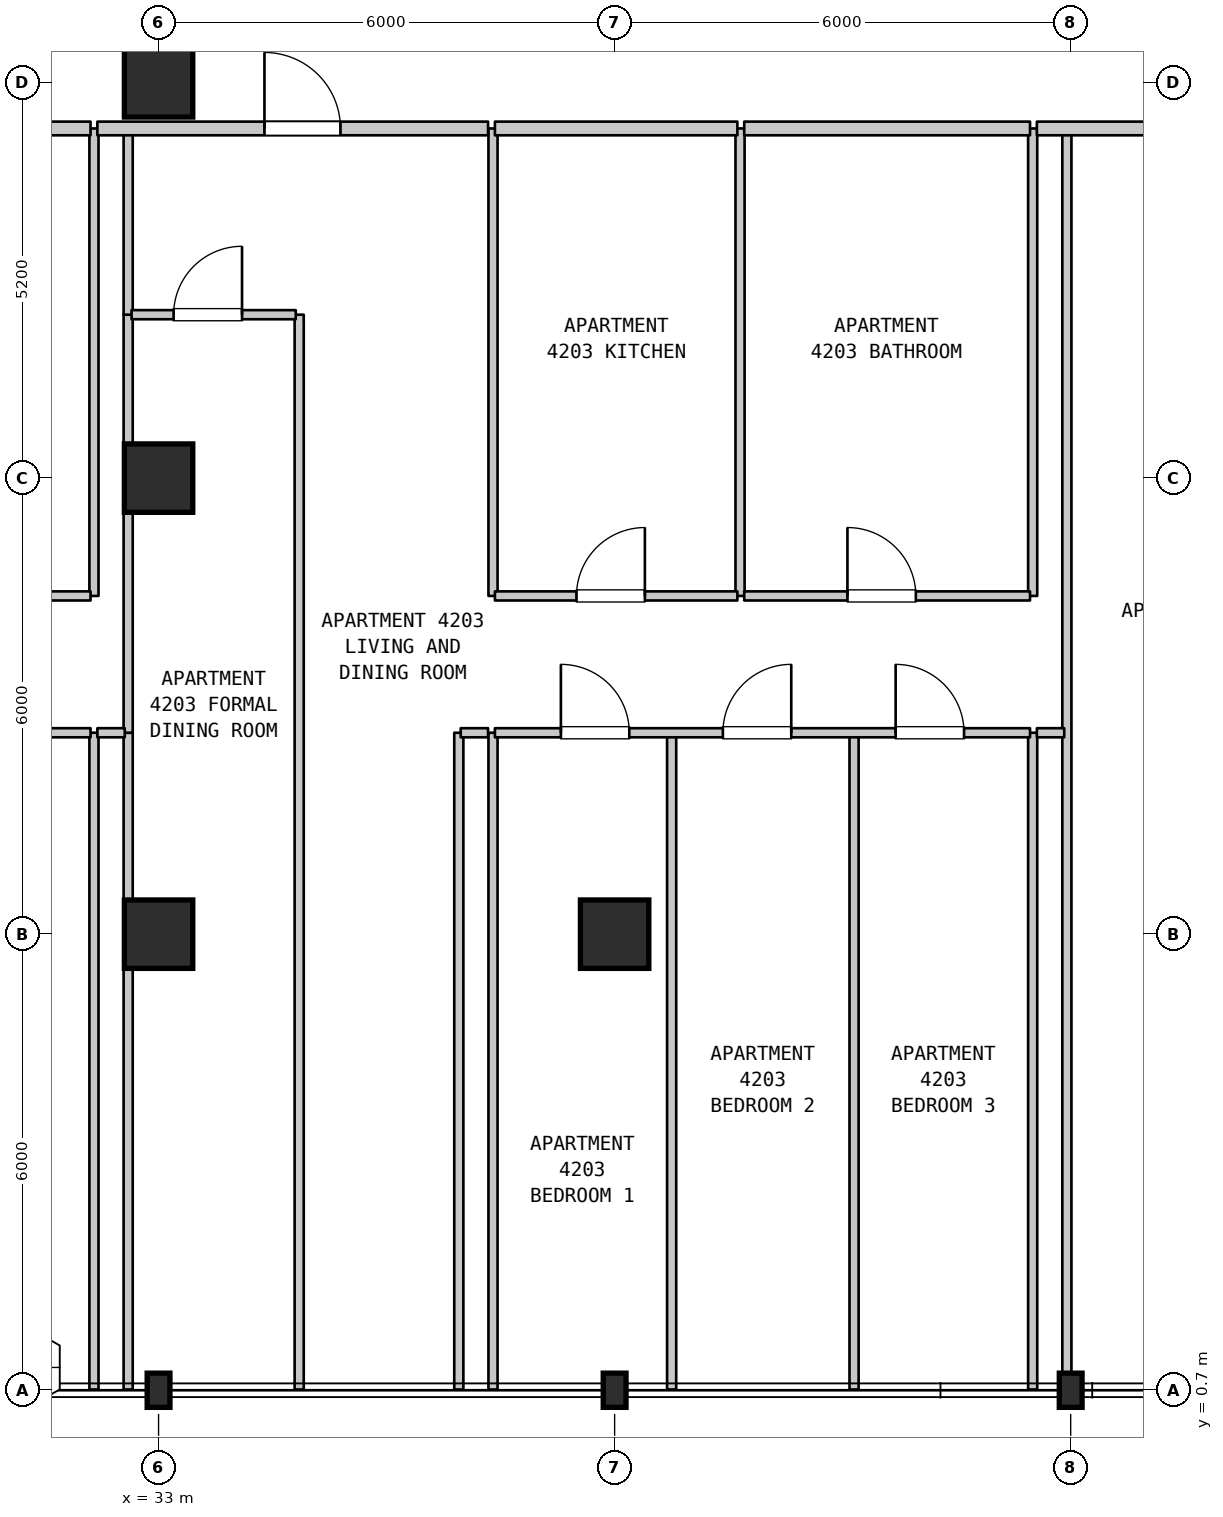
"""IFC4 building model, lengths in metres.
Left out: names, types, materials, properties, quantities, classifications, styles, units other than length and angle.
Written with IfcOpenShell. Run it as: python <this file> out.ifc"""

import sys

from ifc_helpers import new_model, si_unit, direction, frame, frame_2d, origin, origin_2d, place, context, subcontext, project, spatial, rectangle, i_section, extrude, element, fill, save


model = new_model("IFC4")
c1 = context("Model", 3, precision=1e-05, world=origin(), true_north=direction((0.0, 1.0)))
c2 = subcontext(c1, "Body", "Model", "MODEL_VIEW")
j1 = project(units=[si_unit("LENGTHUNIT", "METRE"), si_unit("PLANEANGLEUNIT", "RADIAN")], contexts=[c1])
p1 = place(None, origin())
s1 = spatial("IfcSite", under=j1, at=p1, CompositionType="ELEMENT")
p2 = place(p1, origin())
s2 = spatial("IfcBuilding", under=s1, at=p2, CompositionType="ELEMENT")
p3 = place(p2, frame((0.0, 0.0, 172.8)))
s3 = spatial("IfcBuildingStorey", under=s2, at=p3, CompositionType="ELEMENT", Elevation=172.8)
p4 = place(p3, frame((33.0, 0.7, 0.0), z_axis=(0.0, 0.0, 1.0), x_axis=(1.0, 0.0, 0.0)))
e1 = element("IfcColumn", 1, at=p4, inside=s3, PredefinedType="COLUMN", context=c2, shape_type="SweptSolid", body=[
    extrude(i_section(OverallWidth=0.3, OverallDepth=0.45, WebThickness=0.014, FlangeThickness=0.026, FilletRadius=0.027, at=origin_2d()), origin(), (0.0, 0.0, 1.0), 3.7),
])
for number, where, z_axis, x_axis in (
    (2, (33.0, 6.7, 0.0), (0.0, 0.0, 1.0), (1.0, 0.0, 0.0)),
    (3, (33.0, 12.7, 0.0), (0.0, 0.0, 1.0), (1.0, 0.0, 0.0)),
    (4, (33.0, 17.9, 0.0), (0.0, 0.0, 1.0), (1.0, 0.0, 0.0)),
):
    element("IfcColumn", number, at=place(p3, frame(where, z_axis=z_axis, x_axis=x_axis)), inside=s3, PredefinedType="COLUMN", context=c2, shape_type="SweptSolid", body=[
        extrude(rectangle(XDim=0.9, YDim=0.9, at=origin_2d()), origin(), (0.0, 0.0, 1.0), 3.7),
    ])
p5 = place(p3, frame((39.0, 0.7, 0.0), z_axis=(0.0, 0.0, 1.0), x_axis=(1.0, 0.0, 0.0)))
e5 = element("IfcColumn", 5, at=p5, inside=s3, PredefinedType="COLUMN", context=c2, shape_type="SweptSolid", body=[
    extrude(i_section(OverallWidth=0.3, OverallDepth=0.45, WebThickness=0.014, FlangeThickness=0.026, FilletRadius=0.027, at=origin_2d()), origin(), (0.0, 0.0, 1.0), 3.7),
])
p6 = place(p3, frame((39.0, 6.7, 0.0), z_axis=(0.0, 0.0, 1.0), x_axis=(1.0, 0.0, 0.0)))
e6 = element("IfcColumn", 6, at=p6, inside=s3, PredefinedType="COLUMN", context=c2, shape_type="SweptSolid", body=[
    extrude(rectangle(XDim=0.9, YDim=0.9, at=origin_2d()), origin(), (0.0, 0.0, 1.0), 3.7),
])
p7 = place(p3, frame((45.0, 0.7, 0.0), z_axis=(0.0, 0.0, 1.0), x_axis=(1.0, 0.0, 0.0)))
e7 = element("IfcColumn", 7, at=p7, inside=s3, PredefinedType="COLUMN", context=c2, shape_type="SweptSolid", body=[
    extrude(i_section(OverallWidth=0.3, OverallDepth=0.45, WebThickness=0.014, FlangeThickness=0.026, FilletRadius=0.027, at=origin_2d()), origin(), (0.0, 0.0, 1.0), 3.7),
])
p8 = place(p3, frame((32.15, 0.71, 0.0), z_axis=(0.0, 0.0, 1.0), x_axis=(0.0, 1.0, 0.0)))
e8 = element("IfcWall", 8, at=p8, inside=s3, PredefinedType="PARTITIONING", context=c2, shape_type="SweptSolid", body=[
    extrude(rectangle(XDim=8.64, YDim=0.12, at=frame_2d((4.32, 0.0))), origin(), (0.0, 0.0, 1.0), 3.39),
])
p9 = place(p3, frame((32.15, 11.15, 0.0), z_axis=(0.0, 0.0, 1.0), x_axis=(0.0, 1.0, 0.0)))
e9 = element("IfcWall", 9, at=p9, inside=s3, PredefinedType="PARTITIONING", context=c2, shape_type="SweptSolid", body=[
    extrude(rectangle(XDim=6.15, YDim=0.12, at=frame_2d((3.075, 0.0))), origin(), (0.0, 0.0, 1.0), 3.39),
])
p10 = place(p3, frame((32.6, 0.71, 0.0), z_axis=(0.0, 0.0, 1.0), x_axis=(0.0, 1.0, 0.0)))
e10 = element("IfcWall", 10, at=p10, inside=s3, PredefinedType="PARTITIONING", context=c2, shape_type="SweptSolid", body=[
    extrude(rectangle(XDim=8.64, YDim=0.12, at=frame_2d((4.32, 0.0))), origin(), (0.0, 0.0, 1.0), 3.39),
])
p11 = place(p3, frame((32.6, 9.35, 0.0), z_axis=(0.0, 0.0, 1.0), x_axis=(0.0, 1.0, 0.0)))
e11 = element("IfcWall", 11, at=p11, inside=s3, PredefinedType="PARTITIONING", context=c2, shape_type="SweptSolid", body=[
    extrude(rectangle(XDim=5.5, YDim=0.12, at=frame_2d((2.75, 0.0))), origin(), (0.0, 0.0, 1.0), 3.39),
])
p12 = place(p3, frame((32.6, 14.85, 0.0), z_axis=(0.0, 0.0, 1.0), x_axis=(0.0, 1.0, 0.0)))
e12 = element("IfcWall", 12, at=p12, inside=s3, PredefinedType="PARTITIONING", context=c2, shape_type="SweptSolid", body=[
    extrude(rectangle(XDim=2.45, YDim=0.12, at=frame_2d((1.225, 0.0))), origin(), (0.0, 0.0, 1.0), 3.39),
])
p13 = place(p3, frame((34.85, 0.71, 0.0), z_axis=(0.0, 0.0, 1.0), x_axis=(0.0, 1.0, 0.0)))
e13 = element("IfcWall", 13, at=p13, inside=s3, PredefinedType="PARTITIONING", context=c2, shape_type="SweptSolid", body=[
    extrude(rectangle(XDim=14.14, YDim=0.12, at=frame_2d((7.07, 0.0))), origin(), (0.0, 0.0, 1.0), 3.39),
])
for number, where, z_axis, x_axis in (
    (14, (36.95, 0.71, 0.0), (0.0, 0.0, 1.0), (0.0, 1.0, 0.0)),
    (15, (37.4, 0.71, 0.0), (0.0, 0.0, 1.0), (0.0, 1.0, 0.0)),
):
    element("IfcWall", number, at=place(p3, frame(where, z_axis=z_axis, x_axis=x_axis)), inside=s3, PredefinedType="PARTITIONING", context=c2, shape_type="SweptSolid", body=[
        extrude(rectangle(XDim=8.64, YDim=0.12, at=frame_2d((4.32, 0.0))), origin(), (0.0, 0.0, 1.0), 3.39),
    ])
p14 = place(p3, frame((37.4, 11.15, 0.0), z_axis=(0.0, 0.0, 1.0), x_axis=(0.0, 1.0, 0.0)))
e16 = element("IfcWall", 16, at=p14, inside=s3, PredefinedType="PARTITIONING", context=c2, shape_type="SweptSolid", body=[
    extrude(rectangle(XDim=6.15, YDim=0.12, at=frame_2d((3.075, 0.0))), origin(), (0.0, 0.0, 1.0), 3.39),
])
p15 = place(p3, frame((39.75, 0.71, 0.0), z_axis=(0.0, 0.0, 1.0), x_axis=(0.0, 1.0, 0.0)))
e17 = element("IfcWall", 17, at=p15, inside=s3, PredefinedType="PARTITIONING", context=c2, shape_type="SweptSolid", body=[
    extrude(rectangle(XDim=8.64, YDim=0.12, at=frame_2d((4.32, 0.0))), origin(), (0.0, 0.0, 1.0), 3.39),
])
p16 = place(p3, frame((40.65, 11.15, 0.0), z_axis=(0.0, 0.0, 1.0), x_axis=(0.0, 1.0, 0.0)))
e18 = element("IfcWall", 18, at=p16, inside=s3, PredefinedType="PARTITIONING", context=c2, shape_type="SweptSolid", body=[
    extrude(rectangle(XDim=6.15, YDim=0.12, at=frame_2d((3.075, 0.0))), origin(), (0.0, 0.0, 1.0), 3.39),
])
for number, where, z_axis, x_axis in (
    (19, (42.15, 0.71, 0.0), (0.0, 0.0, 1.0), (0.0, 1.0, 0.0)),
    (20, (44.5, 0.71, 0.0), (0.0, 0.0, 1.0), (0.0, 1.0, 0.0)),
):
    element("IfcWall", number, at=place(p3, frame(where, z_axis=z_axis, x_axis=x_axis)), inside=s3, PredefinedType="PARTITIONING", context=c2, shape_type="SweptSolid", body=[
        extrude(rectangle(XDim=8.64, YDim=0.12, at=frame_2d((4.32, 0.0))), origin(), (0.0, 0.0, 1.0), 3.39),
    ])
p17 = place(p3, frame((44.5, 11.15, 0.0), z_axis=(0.0, 0.0, 1.0), x_axis=(0.0, 1.0, 0.0)))
e21 = element("IfcWall", 21, at=p17, inside=s3, PredefinedType="PARTITIONING", context=c2, shape_type="SweptSolid", body=[
    extrude(rectangle(XDim=6.15, YDim=0.12, at=frame_2d((3.075, 0.0))), origin(), (0.0, 0.0, 1.0), 3.39),
])
p18 = place(p3, frame((44.95, 0.71, 0.0), z_axis=(0.0, 0.0, 1.0), x_axis=(0.0, 1.0, 0.0)))
e22 = element("IfcWall", 22, at=p18, inside=s3, PredefinedType="PARTITIONING", context=c2, shape_type="SweptSolid", body=[
    extrude(rectangle(XDim=16.59, YDim=0.12, at=frame_2d((8.295, 0.0))), origin(), (0.0, 0.0, 1.0), 3.39),
])
p19 = place(p3, frame((25.375, 9.35, 0.0), z_axis=(0.0, 0.0, 1.0), x_axis=(1.0, 0.0, 0.0)))
e23 = element("IfcWall", 23, at=p19, inside=s3, PredefinedType="PARTITIONING", context=c2, shape_type="SweptSolid", body=[
    extrude(rectangle(XDim=6.73, YDim=0.12, at=frame_2d((3.365, 0.0))), origin(), (0.0, 0.0, 1.0), 3.39),
])
p20 = place(p19, frame((1.31, 0.0, 0.0)))
e24 = element("IfcOpeningElement", 24, at=p20, cuts=e23, PredefinedType="OPENING", context=c2, shape_type="SweptSolid", body=[
    extrude(rectangle(XDim=0.9, YDim=2.15, at=frame_2d((0.45, 1.075))), frame((0.0, 0.07, 0.0), z_axis=(0.0, -1.0, 0.0), x_axis=(1.0, 0.0, 0.0)), (0.0, 0.0, 1.0), 0.14),
])
p21 = place(p19, frame((4.37, 0.0, 0.0)))
e25 = element("IfcOpeningElement", 25, at=p21, cuts=e23, PredefinedType="OPENING", context=c2, shape_type="SweptSolid", body=[
    extrude(rectangle(XDim=0.9, YDim=2.15, at=frame_2d((0.45, 1.075))), frame((0.0, 0.07, 0.0), z_axis=(0.0, -1.0, 0.0), x_axis=(1.0, 0.0, 0.0)), (0.0, 0.0, 1.0), 0.14),
])
for number, where, z_axis, x_axis in (
    (26, (32.195, 9.35, 0.0), (0.0, 0.0, 1.0), (1.0, 0.0, 0.0)),
    (27, (36.975, 9.35, 0.0), (0.0, 0.0, 1.0), (1.0, 0.0, 0.0)),
):
    element("IfcWall", number, at=place(p3, frame(where, z_axis=z_axis, x_axis=x_axis)), inside=s3, PredefinedType="PARTITIONING", context=c2, shape_type="SweptSolid", body=[
        extrude(rectangle(XDim=0.36, YDim=0.12, at=frame_2d((0.18, 0.0))), origin(), (0.0, 0.0, 1.0), 3.39),
    ])
p22 = place(p3, frame((37.425, 9.35, 0.0), z_axis=(0.0, 0.0, 1.0), x_axis=(1.0, 0.0, 0.0)))
e28 = element("IfcWall", 28, at=p22, inside=s3, PredefinedType="PARTITIONING", context=c2, shape_type="SweptSolid", body=[
    extrude(rectangle(XDim=7.04, YDim=0.12, at=frame_2d((3.52, 0.0))), origin(), (0.0, 0.0, 1.0), 3.39),
])
p23 = place(p22, frame((0.868, 0.0, 0.0)))
e29 = element("IfcOpeningElement", 29, at=p23, cuts=e28, PredefinedType="OPENING", context=c2, shape_type="SweptSolid", body=[
    extrude(rectangle(XDim=0.9, YDim=2.15, at=frame_2d((0.45, 1.075))), frame((0.0, 0.07, 0.0), z_axis=(0.0, -1.0, 0.0), x_axis=(1.0, 0.0, 0.0)), (0.0, 0.0, 1.0), 0.14),
])
p24 = place(p22, frame((2.999, 0.0, 0.0)))
e30 = element("IfcOpeningElement", 30, at=p24, cuts=e28, PredefinedType="OPENING", context=c2, shape_type="SweptSolid", body=[
    extrude(rectangle(XDim=0.9, YDim=2.15, at=frame_2d((0.45, 1.075))), frame((0.0, 0.07, 0.0), z_axis=(0.0, -1.0, 0.0), x_axis=(1.0, 0.0, 0.0)), (0.0, 0.0, 1.0), 0.14),
])
p25 = place(p22, frame((5.272, 0.0, 0.0)))
e31 = element("IfcOpeningElement", 31, at=p25, cuts=e28, PredefinedType="OPENING", context=c2, shape_type="SweptSolid", body=[
    extrude(rectangle(XDim=0.9, YDim=2.15, at=frame_2d((0.45, 1.075))), frame((0.0, 0.07, 0.0), z_axis=(0.0, -1.0, 0.0), x_axis=(1.0, 0.0, 0.0)), (0.0, 0.0, 1.0), 0.14),
])
p26 = place(p3, frame((44.555, 9.35, 0.0), z_axis=(0.0, 0.0, 1.0), x_axis=(1.0, 0.0, 0.0)))
e32 = element("IfcWall", 32, at=p26, inside=s3, PredefinedType="PARTITIONING", context=c2, shape_type="SweptSolid", body=[
    extrude(rectangle(XDim=0.36, YDim=0.12, at=frame_2d((0.18, 0.0))), origin(), (0.0, 0.0, 1.0), 3.39),
])
p27 = place(p3, frame((28.512, 11.15, 0.0), z_axis=(0.0, 0.0, 1.0), x_axis=(1.0, 0.0, 0.0)))
e33 = element("IfcWall", 33, at=p27, inside=s3, PredefinedType="PARTITIONING", context=c2, shape_type="SweptSolid", body=[
    extrude(rectangle(XDim=3.593, YDim=0.12, at=frame_2d((1.796, 0.0))), origin(), (0.0, 0.0, 1.0), 3.39),
])
p28 = place(p27, frame((1.346, 0.0, 0.0)))
e34 = element("IfcOpeningElement", 34, at=p28, cuts=e33, PredefinedType="OPENING", context=c2, shape_type="SweptSolid", body=[
    extrude(rectangle(XDim=0.9, YDim=2.1, at=frame_2d((0.45, 1.05))), frame((0.0, 0.07, 0.0), z_axis=(0.0, -1.0, 0.0), x_axis=(1.0, 0.0, 0.0)), (0.0, 0.0, 1.0), 0.14),
])
p29 = place(p3, frame((37.425, 11.15, 0.0), z_axis=(0.0, 0.0, 1.0), x_axis=(1.0, 0.0, 0.0)))
e35 = element("IfcWall", 35, at=p29, inside=s3, PredefinedType="PARTITIONING", context=c2, shape_type="SweptSolid", body=[
    extrude(rectangle(XDim=3.19, YDim=0.12, at=frame_2d((1.595, 0.0))), origin(), (0.0, 0.0, 1.0), 3.39),
])
p30 = place(p29, frame((1.073, 0.0, 0.0)))
e36 = element("IfcOpeningElement", 36, at=p30, cuts=e35, PredefinedType="OPENING", context=c2, shape_type="SweptSolid", body=[
    extrude(rectangle(XDim=0.9, YDim=2.15, at=frame_2d((0.45, 1.075))), frame((0.0, 0.07, 0.0), z_axis=(0.0, -1.0, 0.0), x_axis=(1.0, 0.0, 0.0)), (0.0, 0.0, 1.0), 0.14),
])
p31 = place(p3, frame((40.705, 11.15, 0.0), z_axis=(0.0, 0.0, 1.0), x_axis=(1.0, 0.0, 0.0)))
e37 = element("IfcWall", 37, at=p31, inside=s3, PredefinedType="PARTITIONING", context=c2, shape_type="SweptSolid", body=[
    extrude(rectangle(XDim=3.76, YDim=0.12, at=frame_2d((1.88, 0.0))), origin(), (0.0, 0.0, 1.0), 3.39),
])
p32 = place(p31, frame((1.358, 0.0, 0.0)))
e38 = element("IfcOpeningElement", 38, at=p32, cuts=e37, PredefinedType="OPENING", context=c2, shape_type="SweptSolid", body=[
    extrude(rectangle(XDim=0.9, YDim=2.1, at=frame_2d((0.45, 1.05))), frame((0.0, 0.07, 0.0), z_axis=(0.0, -1.0, 0.0), x_axis=(1.0, 0.0, 0.0)), (0.0, 0.0, 1.0), 0.14),
])
p33 = place(p3, frame((32.645, 14.85, 0.0), z_axis=(0.0, 0.0, 1.0), x_axis=(1.0, 0.0, 0.0)))
e39 = element("IfcWall", 39, at=p33, inside=s3, PredefinedType="PARTITIONING", context=c2, shape_type="SweptSolid", body=[
    extrude(rectangle(XDim=2.16, YDim=0.12, at=frame_2d((1.08, 0.0))), origin(), (0.0, 0.0, 1.0), 3.39),
])
p34 = place(p33, frame((0.553, 0.0, 0.0)))
e40 = element("IfcOpeningElement", 40, at=p34, cuts=e39, PredefinedType="OPENING", context=c2, shape_type="SweptSolid", body=[
    extrude(rectangle(XDim=0.9, YDim=2.15, at=frame_2d((0.45, 1.075))), frame((0.0, 0.07, 0.0), z_axis=(0.0, -1.0, 0.0), x_axis=(1.0, 0.0, 0.0)), (0.0, 0.0, 1.0), 0.14),
])
p35 = place(p3, frame((28.512, 17.3, 0.0), z_axis=(0.0, 0.0, 1.0), x_axis=(1.0, 0.0, 0.0)))
e41 = element("IfcWall", 41, at=p35, inside=s3, PredefinedType="STANDARD", context=c2, shape_type="SweptSolid", body=[
    extrude(rectangle(XDim=3.593, YDim=0.18, at=frame_2d((1.796, 0.0))), origin(), (0.0, 0.0, 1.0), 3.39),
])
p36 = place(p3, frame((32.195, 17.3, 0.0), z_axis=(0.0, 0.0, 1.0), x_axis=(1.0, 0.0, 0.0)))
e42 = element("IfcWall", 42, at=p36, inside=s3, PredefinedType="STANDARD", context=c2, shape_type="SweptSolid", body=[
    extrude(rectangle(XDim=5.14, YDim=0.18, at=frame_2d((2.57, 0.0))), origin(), (0.0, 0.0, 1.0), 3.39),
])
p37 = place(p36, frame((2.198, 0.0, 0.0)))
e43 = element("IfcOpeningElement", 43, at=p37, cuts=e42, PredefinedType="OPENING", context=c2, shape_type="SweptSolid", body=[
    extrude(rectangle(XDim=1.0, YDim=2.15, at=frame_2d((0.5, 1.075))), frame((0.0, 0.1, 0.0), z_axis=(0.0, -1.0, 0.0), x_axis=(1.0, 0.0, 0.0)), (0.0, 0.0, 1.0), 0.2),
])
p38 = place(p3, frame((37.425, 17.3, 0.0), z_axis=(0.0, 0.0, 1.0), x_axis=(1.0, 0.0, 0.0)))
e44 = element("IfcWall", 44, at=p38, inside=s3, PredefinedType="STANDARD", context=c2, shape_type="SweptSolid", body=[
    extrude(rectangle(XDim=3.19, YDim=0.18, at=frame_2d((1.595, 0.0))), origin(), (0.0, 0.0, 1.0), 3.39),
])
p39 = place(p3, frame((40.705, 17.3, 0.0), z_axis=(0.0, 0.0, 1.0), x_axis=(1.0, 0.0, 0.0)))
e45 = element("IfcWall", 45, at=p39, inside=s3, PredefinedType="STANDARD", context=c2, shape_type="SweptSolid", body=[
    extrude(rectangle(XDim=3.76, YDim=0.18, at=frame_2d((1.88, 0.0))), origin(), (0.0, 0.0, 1.0), 3.39),
])
p40 = place(p3, frame((44.555, 17.3, 0.0), z_axis=(0.0, 0.0, 1.0), x_axis=(1.0, 0.0, 0.0)))
e46 = element("IfcWall", 46, at=p40, inside=s3, PredefinedType="STANDARD", context=c2, shape_type="SweptSolid", body=[
    extrude(rectangle(XDim=4.97, YDim=0.18, at=frame_2d((2.485, 0.0))), origin(), (0.0, 0.0, 1.0), 3.39),
])
p41 = place(p40, frame((1.913, 0.0, 0.0)))
e47 = element("IfcOpeningElement", 47, at=p41, cuts=e46, PredefinedType="OPENING", context=c2, shape_type="SweptSolid", body=[
    extrude(rectangle(XDim=1.0, YDim=2.15, at=frame_2d((0.5, 1.075))), frame((0.0, 0.1, 0.0), z_axis=(0.0, -1.0, 0.0), x_axis=(1.0, 0.0, 0.0)), (0.0, 0.0, 1.0), 0.2),
])
p42 = place(p23, origin())
e48 = element("IfcDoor", 48, at=p42, inside=s3, OperationType="SINGLE_SWING_LEFT", PredefinedType="DOOR", context=c2, shape_type="SweptSolid", body=[
    extrude(rectangle(XDim=0.9, YDim=2.15, at=frame_2d((0.45, 1.075))), frame((0.0, 0.025, 0.0), z_axis=(0.0, -1.0, 0.0), x_axis=(1.0, 0.0, 0.0)), (0.0, 0.0, 1.0), 0.05),
])
fill(e29, e48)
p43 = place(p24, origin())
e49 = element("IfcDoor", 49, at=p43, inside=s3, OperationType="SINGLE_SWING_RIGHT", PredefinedType="DOOR", context=c2, shape_type="SweptSolid", body=[
    extrude(rectangle(XDim=0.9, YDim=2.15, at=frame_2d((0.45, 1.075))), frame((0.0, 0.025, 0.0), z_axis=(0.0, -1.0, 0.0), x_axis=(1.0, 0.0, 0.0)), (0.0, 0.0, 1.0), 0.05),
])
fill(e30, e49)
p44 = place(p25, origin())
e50 = element("IfcDoor", 50, at=p44, inside=s3, OperationType="SINGLE_SWING_LEFT", PredefinedType="DOOR", context=c2, shape_type="SweptSolid", body=[
    extrude(rectangle(XDim=0.9, YDim=2.15, at=frame_2d((0.45, 1.075))), frame((0.0, 0.025, 0.0), z_axis=(0.0, -1.0, 0.0), x_axis=(1.0, 0.0, 0.0)), (0.0, 0.0, 1.0), 0.05),
])
fill(e31, e50)
p45 = place(p30, origin())
e51 = element("IfcDoor", 51, at=p45, inside=s3, OperationType="SINGLE_SWING_RIGHT", PredefinedType="DOOR", context=c2, shape_type="SweptSolid", body=[
    extrude(rectangle(XDim=0.9, YDim=2.15, at=frame_2d((0.45, 1.075))), frame((0.0, 0.025, 0.0), z_axis=(0.0, -1.0, 0.0), x_axis=(1.0, 0.0, 0.0)), (0.0, 0.0, 1.0), 0.05),
])
fill(e36, e51)
p46 = place(p32, origin())
e52 = element("IfcDoor", 52, at=p46, inside=s3, OperationType="SINGLE_SWING_LEFT", PredefinedType="DOOR", context=c2, shape_type="SweptSolid", body=[
    extrude(rectangle(XDim=0.9, YDim=2.1, at=frame_2d((0.45, 1.05))), frame((0.0, 0.025, 0.0), z_axis=(0.0, -1.0, 0.0), x_axis=(1.0, 0.0, 0.0)), (0.0, 0.0, 1.0), 0.05),
])
fill(e38, e52)
p47 = place(p34, origin())
e53 = element("IfcDoor", 53, at=p47, inside=s3, OperationType="SINGLE_SWING_RIGHT", PredefinedType="DOOR", context=c2, shape_type="SweptSolid", body=[
    extrude(rectangle(XDim=0.9, YDim=2.15, at=frame_2d((0.45, 1.075))), frame((0.0, 0.025, 0.0), z_axis=(0.0, -1.0, 0.0), x_axis=(1.0, 0.0, 0.0)), (0.0, 0.0, 1.0), 0.05),
])
fill(e40, e53)
p48 = place(p37, origin())
e54 = element("IfcDoor", 54, at=p48, inside=s3, OperationType="SINGLE_SWING_LEFT", PredefinedType="DOOR", context=c2, shape_type="SweptSolid", body=[
    extrude(rectangle(XDim=1.0, YDim=2.15, at=frame_2d((0.5, 1.075))), frame((0.0, 0.025, 0.0), z_axis=(0.0, -1.0, 0.0), x_axis=(1.0, 0.0, 0.0)), (0.0, 0.0, 1.0), 0.05),
])
fill(e43, e54)
save(model, sys.argv[1])
